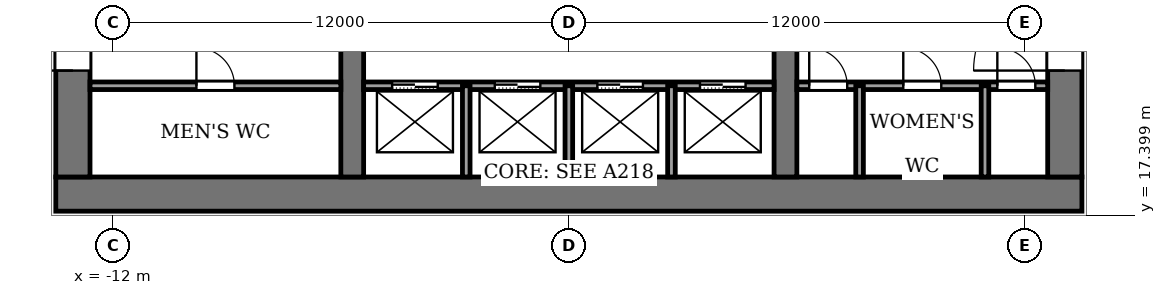
"""IFC4 building model, lengths in metres.
Left out: names, types, materials, properties, quantities, classifications, styles, units other than length and angle.
Written with IfcOpenShell. Run it as: python <this file> out.ifc"""

import sys

from ifc_helpers import new_model, si_unit, direction, frame, frame_2d, origin, place, context, subcontext, project, spatial, rectangle, extrude, element, fill, save


model = new_model("IFC4")
c1 = context("Model", 3, precision=1e-05, world=origin(), true_north=direction((0.0, 1.0)))
c2 = subcontext(c1, "Body", "Model", "MODEL_VIEW")
j1 = project(units=[si_unit("LENGTHUNIT", "METRE"), si_unit("PLANEANGLEUNIT", "RADIAN")], contexts=[c1])
p1 = place(None, origin())
s1 = spatial("IfcSite", under=j1, at=p1, CompositionType="ELEMENT")
p2 = place(p1, origin())
s2 = spatial("IfcBuilding", under=s1, at=p2, CompositionType="ELEMENT")
p3 = place(p2, frame((0.0, 0.0, 177.0)))
s3 = spatial("IfcBuildingStorey", under=s2, at=p3, CompositionType="ELEMENT", Elevation=177.0)
p4 = place(p3, frame((-13.5, 17.95, -0.13), z_axis=(0.0, 0.0, 1.0), x_axis=(1.0, 0.0, 0.0)))
e1 = element("IfcWall", 1, at=p4, inside=s3, PredefinedType="SHEAR", context=c2, shape_type="SweptSolid", body=[
    extrude(rectangle(XDim=27.0, YDim=0.9, at=frame_2d((13.5, 0.0))), origin(), (0.0, 0.0, 1.0), 5.0),
])
p5 = place(p3, frame((-13.05, 18.4, -0.13), z_axis=(0.0, 0.0, 1.0), x_axis=(0.0, 1.0, 0.0)))
e2 = element("IfcWall", 2, at=p5, inside=s3, PredefinedType="SHEAR", context=c2, shape_type="SweptSolid", body=[
    extrude(rectangle(XDim=19.2, YDim=0.9, at=frame_2d((9.6, 0.0))), origin(), (0.0, 0.0, 1.0), 5.0),
])
p6 = place(p5, frame((2.8, 0.0, 0.13)))
e3 = element("IfcOpeningElement", 3, at=p6, cuts=e2, PredefinedType="OPENING", context=c2, shape_type="SweptSolid", body=[
    extrude(rectangle(XDim=2.4, YDim=2.4, at=frame_2d((1.2, 1.2))), frame((0.0, 0.46, 0.0), z_axis=(0.0, -1.0, 0.0), x_axis=(1.0, 0.0, 0.0)), (0.0, 0.0, 1.0), 0.92),
])
p7 = place(p5, frame((13.4, 0.0, 0.13)))
e4 = element("IfcOpeningElement", 4, at=p7, cuts=e2, PredefinedType="OPENING", context=c2, shape_type="SweptSolid", body=[
    extrude(rectangle(XDim=1.4, YDim=2.2, at=frame_2d((0.7, 1.1))), frame((0.0, 0.46, 0.0), z_axis=(0.0, -1.0, 0.0), x_axis=(1.0, 0.0, 0.0)), (0.0, 0.0, 1.0), 0.92),
])
p8 = place(p3, frame((13.05, 18.4, -0.13), z_axis=(0.0, 0.0, 1.0), x_axis=(0.0, 1.0, 0.0)))
e5 = element("IfcWall", 5, at=p8, inside=s3, PredefinedType="SHEAR", context=c2, shape_type="SweptSolid", body=[
    extrude(rectangle(XDim=19.2, YDim=0.9, at=frame_2d((9.6, 0.0))), origin(), (0.0, 0.0, 1.0), 5.0),
])
p9 = place(p8, frame((2.8, 0.0, 0.13)))
e6 = element("IfcOpeningElement", 6, at=p9, cuts=e5, PredefinedType="OPENING", context=c2, shape_type="SweptSolid", body=[
    extrude(rectangle(XDim=2.4, YDim=2.4, at=frame_2d((1.2, 1.2))), frame((0.0, 0.46, 0.0), z_axis=(0.0, -1.0, 0.0), x_axis=(1.0, 0.0, 0.0)), (0.0, 0.0, 1.0), 0.92),
])
p10 = place(p8, frame((13.3, 0.0, 0.13)))
e7 = element("IfcOpeningElement", 7, at=p10, cuts=e5, PredefinedType="OPENING", context=c2, shape_type="SweptSolid", body=[
    extrude(rectangle(XDim=2.4, YDim=2.4, at=frame_2d((1.2, 1.2))), frame((0.0, 0.46, 0.0), z_axis=(0.0, -1.0, 0.0), x_axis=(1.0, 0.0, 0.0)), (0.0, 0.0, 1.0), 0.92),
])
p11 = place(p3, frame((-5.7, 18.4, -0.13), z_axis=(0.0, 0.0, 1.0), x_axis=(0.0, 1.0, 0.0)))
e8 = element("IfcWall", 8, at=p11, inside=s3, PredefinedType="SHEAR", context=c2, shape_type="SweptSolid", body=[
    extrude(rectangle(XDim=19.2, YDim=0.6, at=frame_2d((9.6, 0.0))), origin(), (0.0, 0.0, 1.0), 5.0),
])
p12 = place(p11, frame((8.35, 0.0, 0.13)))
e9 = element("IfcOpeningElement", 9, at=p12, cuts=e8, PredefinedType="OPENING", context=c2, shape_type="SweptSolid", body=[
    extrude(rectangle(XDim=0.9, YDim=2.1, at=frame_2d((0.45, 1.05))), frame((0.0, 0.31, 0.0), z_axis=(0.0, -1.0, 0.0), x_axis=(1.0, 0.0, 0.0)), (0.0, 0.0, 1.0), 0.62),
])
p13 = place(p3, frame((5.7, 18.4, -0.13), z_axis=(0.0, 0.0, 1.0), x_axis=(0.0, 1.0, 0.0)))
e10 = element("IfcWall", 10, at=p13, inside=s3, PredefinedType="SHEAR", context=c2, shape_type="SweptSolid", body=[
    extrude(rectangle(XDim=19.2, YDim=0.6, at=frame_2d((9.6, 0.0))), origin(), (0.0, 0.0, 1.0), 5.0),
])
p14 = place(p13, frame((13.3, 0.0, 0.13)))
e11 = element("IfcOpeningElement", 11, at=p14, cuts=e10, PredefinedType="OPENING", context=c2, shape_type="SweptSolid", body=[
    extrude(rectangle(XDim=2.4, YDim=2.4, at=frame_2d((1.2, 1.2))), frame((0.0, 0.31, 0.0), z_axis=(0.0, -1.0, 0.0), x_axis=(1.0, 0.0, 0.0)), (0.0, 0.0, 1.0), 0.62),
])
p15 = place(p3, frame((-12.6, 20.8, 0.0), z_axis=(0.0, 0.0, 1.0), x_axis=(1.0, 0.0, 0.0)))
e12 = element("IfcWall", 12, at=p15, inside=s3, PredefinedType="PARTITIONING", context=c2, shape_type="SweptSolid", body=[
    extrude(rectangle(XDim=6.6, YDim=0.2, at=frame_2d((3.3, 0.0))), origin(), (0.0, 0.0, 1.0), 4.87),
])
p16 = place(p15, frame((2.8, 0.0, 0.0)))
e13 = element("IfcOpeningElement", 13, at=p16, cuts=e12, PredefinedType="OPENING", context=c2, shape_type="SweptSolid", body=[
    extrude(rectangle(XDim=1.0, YDim=2.1, at=frame_2d((0.5, 1.05))), frame((0.0, 0.11, 0.0), z_axis=(0.0, -1.0, 0.0), x_axis=(1.0, 0.0, 0.0)), (0.0, 0.0, 1.0), 0.22),
])
p17 = place(p3, frame((-5.4, 20.8, 0.0), z_axis=(0.0, 0.0, 1.0), x_axis=(1.0, 0.0, 0.0)))
e14 = element("IfcWall", 14, at=p17, inside=s3, PredefinedType="PARTITIONING", context=c2, shape_type="SweptSolid", body=[
    extrude(rectangle(XDim=10.8, YDim=0.2, at=frame_2d((5.4, 0.0))), origin(), (0.0, 0.0, 1.0), 4.87),
])
p18 = place(p17, frame((0.75, 0.0, 0.0)))
e15 = element("IfcOpeningElement", 15, at=p18, cuts=e14, PredefinedType="OPENING", context=c2, shape_type="SweptSolid", body=[
    extrude(rectangle(XDim=1.2, YDim=2.2, at=frame_2d((0.6, 1.1))), frame((0.0, 0.11, 0.0), z_axis=(0.0, -1.0, 0.0), x_axis=(1.0, 0.0, 0.0)), (0.0, 0.0, 1.0), 0.22),
])
p19 = place(p17, frame((3.45, 0.0, 0.0)))
e16 = element("IfcOpeningElement", 16, at=p19, cuts=e14, PredefinedType="OPENING", context=c2, shape_type="SweptSolid", body=[
    extrude(rectangle(XDim=1.2, YDim=2.2, at=frame_2d((0.6, 1.1))), frame((0.0, 0.11, 0.0), z_axis=(0.0, -1.0, 0.0), x_axis=(1.0, 0.0, 0.0)), (0.0, 0.0, 1.0), 0.22),
])
p20 = place(p17, frame((6.15, 0.0, 0.0)))
e17 = element("IfcOpeningElement", 17, at=p20, cuts=e14, PredefinedType="OPENING", context=c2, shape_type="SweptSolid", body=[
    extrude(rectangle(XDim=1.2, YDim=2.2, at=frame_2d((0.6, 1.1))), frame((0.0, 0.11, 0.0), z_axis=(0.0, -1.0, 0.0), x_axis=(1.0, 0.0, 0.0)), (0.0, 0.0, 1.0), 0.22),
])
p21 = place(p17, frame((8.85, 0.0, 0.0)))
e18 = element("IfcOpeningElement", 18, at=p21, cuts=e14, PredefinedType="OPENING", context=c2, shape_type="SweptSolid", body=[
    extrude(rectangle(XDim=1.2, YDim=2.2, at=frame_2d((0.6, 1.1))), frame((0.0, 0.11, 0.0), z_axis=(0.0, -1.0, 0.0), x_axis=(1.0, 0.0, 0.0)), (0.0, 0.0, 1.0), 0.22),
])
p22 = place(p3, frame((6.0, 20.8, 0.0), z_axis=(0.0, 0.0, 1.0), x_axis=(1.0, 0.0, 0.0)))
e19 = element("IfcWall", 19, at=p22, inside=s3, PredefinedType="PARTITIONING", context=c2, shape_type="SweptSolid", body=[
    extrude(rectangle(XDim=6.6, YDim=0.2, at=frame_2d((3.3, 0.0))), origin(), (0.0, 0.0, 1.0), 4.87),
])
p23 = place(p22, frame((0.325, 0.0, 0.0)))
e20 = element("IfcOpeningElement", 20, at=p23, cuts=e19, PredefinedType="OPENING", context=c2, shape_type="SweptSolid", body=[
    extrude(rectangle(XDim=1.0, YDim=2.1, at=frame_2d((0.5, 1.05))), frame((0.0, 0.11, 0.0), z_axis=(0.0, -1.0, 0.0), x_axis=(1.0, 0.0, 0.0)), (0.0, 0.0, 1.0), 0.22),
])
p24 = place(p22, frame((2.8, 0.0, 0.0)))
e21 = element("IfcOpeningElement", 21, at=p24, cuts=e19, PredefinedType="OPENING", context=c2, shape_type="SweptSolid", body=[
    extrude(rectangle(XDim=1.0, YDim=2.1, at=frame_2d((0.5, 1.05))), frame((0.0, 0.11, 0.0), z_axis=(0.0, -1.0, 0.0), x_axis=(1.0, 0.0, 0.0)), (0.0, 0.0, 1.0), 0.22),
])
p25 = place(p22, frame((5.275, 0.0, 0.0)))
e22 = element("IfcOpeningElement", 22, at=p25, cuts=e19, PredefinedType="OPENING", context=c2, shape_type="SweptSolid", body=[
    extrude(rectangle(XDim=1.0, YDim=2.1, at=frame_2d((0.5, 1.05))), frame((0.0, 0.11, 0.0), z_axis=(0.0, -1.0, 0.0), x_axis=(1.0, 0.0, 0.0)), (0.0, 0.0, 1.0), 0.22),
])
for number, where, z_axis, x_axis in (
    (23, (-2.7, 18.4, 0.0), (0.0, 0.0, 1.0), (0.0, 1.0, 0.0)),
    (24, (0.0, 18.4, 0.0), (0.0, 0.0, 1.0), (0.0, 1.0, 0.0)),
    (25, (2.7, 18.4, 0.0), (0.0, 0.0, 1.0), (0.0, 1.0, 0.0)),
    (26, (7.65, 18.4, 0.0), (0.0, 0.0, 1.0), (0.0, 1.0, 0.0)),
    (27, (10.95, 18.4, 0.0), (0.0, 0.0, 1.0), (0.0, 1.0, 0.0)),
):
    element("IfcWall", number, at=place(p3, frame(where, z_axis=z_axis, x_axis=x_axis)), inside=s3, PredefinedType="PARTITIONING", context=c2, shape_type="SweptSolid", body=[
        extrude(rectangle(XDim=2.4, YDim=0.2, at=frame_2d((1.2, 0.0))), origin(), (0.0, 0.0, 1.0), 4.87),
    ])
p26 = place(p18, origin())
e28 = element("IfcDoor", 28, at=p26, inside=s3, OperationType="SLIDING_TO_LEFT", PredefinedType="DOOR", context=c2, shape_type="SweptSolid", body=[
    extrude(rectangle(XDim=1.2, YDim=2.2, at=frame_2d((0.6, 1.1))), frame((0.0, 0.025, 0.0), z_axis=(0.0, -1.0, 0.0), x_axis=(1.0, 0.0, 0.0)), (0.0, 0.0, 1.0), 0.05),
])
fill(e15, e28)
p27 = place(p19, origin())
e29 = element("IfcDoor", 29, at=p27, inside=s3, OperationType="SLIDING_TO_LEFT", PredefinedType="DOOR", context=c2, shape_type="SweptSolid", body=[
    extrude(rectangle(XDim=1.2, YDim=2.2, at=frame_2d((0.6, 1.1))), frame((0.0, 0.025, 0.0), z_axis=(0.0, -1.0, 0.0), x_axis=(1.0, 0.0, 0.0)), (0.0, 0.0, 1.0), 0.05),
])
fill(e16, e29)
p28 = place(p20, origin())
e30 = element("IfcDoor", 30, at=p28, inside=s3, OperationType="SLIDING_TO_LEFT", PredefinedType="DOOR", context=c2, shape_type="SweptSolid", body=[
    extrude(rectangle(XDim=1.2, YDim=2.2, at=frame_2d((0.6, 1.1))), frame((0.0, 0.025, 0.0), z_axis=(0.0, -1.0, 0.0), x_axis=(1.0, 0.0, 0.0)), (0.0, 0.0, 1.0), 0.05),
])
fill(e17, e30)
p29 = place(p21, origin())
e31 = element("IfcDoor", 31, at=p29, inside=s3, OperationType="SLIDING_TO_LEFT", PredefinedType="DOOR", context=c2, shape_type="SweptSolid", body=[
    extrude(rectangle(XDim=1.2, YDim=2.2, at=frame_2d((0.6, 1.1))), frame((0.0, 0.025, 0.0), z_axis=(0.0, -1.0, 0.0), x_axis=(1.0, 0.0, 0.0)), (0.0, 0.0, 1.0), 0.05),
])
fill(e18, e31)
p30 = place(p16, origin())
e32 = element("IfcDoor", 32, at=p30, inside=s3, OperationType="SINGLE_SWING_LEFT", PredefinedType="DOOR", context=c2, shape_type="SweptSolid", body=[
    extrude(rectangle(XDim=1.0, YDim=2.1, at=frame_2d((0.5, 1.05))), frame((0.0, 0.025, 0.0), z_axis=(0.0, -1.0, 0.0), x_axis=(1.0, 0.0, 0.0)), (0.0, 0.0, 1.0), 0.05),
])
fill(e13, e32)
p31 = place(p23, origin())
e33 = element("IfcDoor", 33, at=p31, inside=s3, OperationType="SINGLE_SWING_LEFT", PredefinedType="DOOR", context=c2, shape_type="SweptSolid", body=[
    extrude(rectangle(XDim=1.0, YDim=2.1, at=frame_2d((0.5, 1.05))), frame((0.0, 0.025, 0.0), z_axis=(0.0, -1.0, 0.0), x_axis=(1.0, 0.0, 0.0)), (0.0, 0.0, 1.0), 0.05),
])
fill(e20, e33)
p32 = place(p24, origin())
e34 = element("IfcDoor", 34, at=p32, inside=s3, OperationType="SINGLE_SWING_LEFT", PredefinedType="DOOR", context=c2, shape_type="SweptSolid", body=[
    extrude(rectangle(XDim=1.0, YDim=2.1, at=frame_2d((0.5, 1.05))), frame((0.0, 0.025, 0.0), z_axis=(0.0, -1.0, 0.0), x_axis=(1.0, 0.0, 0.0)), (0.0, 0.0, 1.0), 0.05),
])
fill(e21, e34)
p33 = place(p25, origin())
e35 = element("IfcDoor", 35, at=p33, inside=s3, OperationType="SINGLE_SWING_LEFT", PredefinedType="DOOR", context=c2, shape_type="SweptSolid", body=[
    extrude(rectangle(XDim=1.0, YDim=2.1, at=frame_2d((0.5, 1.05))), frame((0.0, 0.025, 0.0), z_axis=(0.0, -1.0, 0.0), x_axis=(1.0, 0.0, 0.0)), (0.0, 0.0, 1.0), 0.05),
])
fill(e22, e35)
p34 = place(p6, origin())
e36 = element("IfcDoor", 36, at=p34, inside=s3, OperationType="DOUBLE_DOOR_SINGLE_SWING", PredefinedType="DOOR", context=c2, shape_type="SweptSolid", body=[
    extrude(rectangle(XDim=2.4, YDim=2.4, at=frame_2d((1.2, 1.2))), frame((0.0, 0.025, 0.0), z_axis=(0.0, -1.0, 0.0), x_axis=(1.0, 0.0, 0.0)), (0.0, 0.0, 1.0), 0.05),
])
fill(e3, e36)
p35 = place(p9, origin())
e37 = element("IfcDoor", 37, at=p35, inside=s3, OperationType="DOUBLE_DOOR_SINGLE_SWING", PredefinedType="DOOR", context=c2, shape_type="SweptSolid", body=[
    extrude(rectangle(XDim=2.4, YDim=2.4, at=frame_2d((1.2, 1.2))), frame((0.0, 0.025, 0.0), z_axis=(0.0, -1.0, 0.0), x_axis=(1.0, 0.0, 0.0)), (0.0, 0.0, 1.0), 0.05),
])
fill(e6, e37)
save(model, sys.argv[1])
